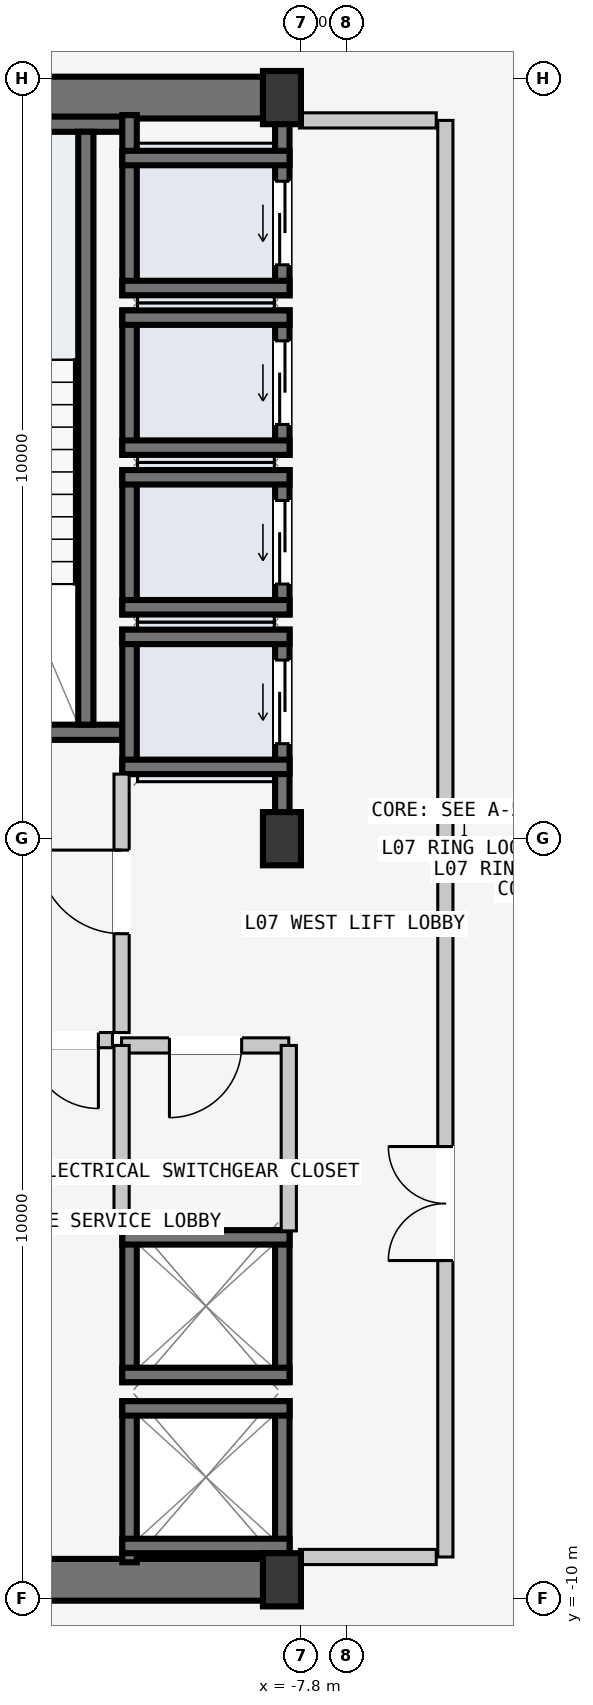
"""IFC4 building model, lengths in metres.
Left out: names, types, materials, properties, quantities, classifications, styles, units other than length and angle.
Written with IfcOpenShell. Run it as: python <this file> out.ifc"""

import sys

from ifc_helpers import new_model, si_unit, direction, frame, frame_2d, origin, origin_2d, place, context, subcontext, project, spatial, rectangle, i_section, extrude, element, fill, save


model = new_model("IFC4")
c1 = context("Model", 3, precision=1e-05, world=origin(), true_north=direction((0.0, 1.0)))
c2 = subcontext(c1, "Body", "Model", "MODEL_VIEW")
j1 = project(units=[si_unit("LENGTHUNIT", "METRE"), si_unit("PLANEANGLEUNIT", "RADIAN")], contexts=[c1])
p1 = place(None, origin())
s1 = spatial("IfcSite", under=j1, at=p1, CompositionType="ELEMENT")
p2 = place(p1, origin())
s2 = spatial("IfcBuilding", under=s1, at=p2, CompositionType="ELEMENT")
p3 = place(p2, frame((0.0, 0.0, 31.2)))
s3 = spatial("IfcBuildingStorey", under=s2, at=p3, CompositionType="ELEMENT", Elevation=31.2)
for number, where, z_axis, x_axis in (
    (1, (-14.53, -9.75, -0.2), (0.0, 0.0, 1.0), (1.0, 0.0, 0.0)),
    (2, (-14.53, 9.75, -0.2), (0.0, 0.0, 1.0), (1.0, 0.0, 0.0)),
):
    element("IfcWall", number, at=place(p3, frame(where, z_axis=z_axis, x_axis=x_axis)), inside=s3, PredefinedType="SHEAR", context=c2, shape_type="SweptSolid", body=[
        extrude(rectangle(XDim=6.46, YDim=0.55, at=frame_2d((3.23, 0.0))), origin(), (0.0, 0.0, 1.0), 3.6),
    ])
p4 = place(p3, frame((-14.25, 1.4, -0.2), z_axis=(0.0, 0.0, 1.0), x_axis=(1.0, 0.0, 0.0)))
e3 = element("IfcWall", 3, at=p4, inside=s3, PredefinedType="SOLIDWALL", context=c2, shape_type="SweptSolid", body=[
    extrude(rectangle(XDim=4.1, YDim=0.2, at=frame_2d((2.05, 0.0))), origin(), (0.0, 0.0, 1.0), 3.6),
])
p5 = place(p4, frame((1.5, 0.0, 0.2)))
e4 = element("IfcOpeningElement", 4, at=p5, cuts=e3, PredefinedType="OPENING", context=c2, shape_type="SweptSolid", body=[
    extrude(rectangle(XDim=1.12, YDim=2.18, at=frame_2d((0.56, 1.09))), frame((0.0, 0.11, 0.0), z_axis=(0.0, -1.0, 0.0), x_axis=(1.0, 0.0, 0.0)), (0.0, 0.0, 1.0), 0.22),
])
p6 = place(p3, frame((-14.25, 9.4, -0.2), z_axis=(0.0, 0.0, 1.0), x_axis=(1.0, 0.0, 0.0)))
e5 = element("IfcWall", 5, at=p6, inside=s3, PredefinedType="SOLIDWALL", context=c2, shape_type="SweptSolid", body=[
    extrude(rectangle(XDim=4.1, YDim=0.2, at=frame_2d((2.05, 0.0))), origin(), (0.0, 0.0, 1.0), 3.6),
])
p7 = place(p3, frame((-10.63, 1.5, -0.2), z_axis=(0.0, 0.0, 1.0), x_axis=(0.0, 1.0, 0.0)))
e6 = element("IfcWall", 6, at=p7, inside=s3, PredefinedType="SOLIDWALL", context=c2, shape_type="SweptSolid", body=[
    extrude(rectangle(XDim=7.8, YDim=0.2, at=frame_2d((3.9, 0.0))), origin(), (0.0, 0.0, 1.0), 3.6),
])
for number, where, z_axis, x_axis in (
    (7, (-8.05, -9.75, 0.0), (0.0, 0.0, 1.0), (1.0, 0.0, 0.0)),
    (8, (-8.05, 0.0, 0.0), (0.0, 0.0, 1.0), (1.0, 0.0, 0.0)),
    (9, (-8.05, 9.75, 0.0), (0.0, 0.0, 1.0), (1.0, 0.0, 0.0)),
):
    element("IfcColumn", number, at=place(p3, frame(where, z_axis=z_axis, x_axis=x_axis)), inside=s3, PredefinedType="COLUMN", context=c2, shape_type="SweptSolid", body=[
        extrude(i_section(OverallWidth=0.5, OverallDepth=0.7, WebThickness=0.028, FlangeThickness=0.045, at=origin_2d()), origin(), (0.0, 0.0, 1.0), 3.6),
    ])
p8 = place(p3, frame((-8.045, 0.21, -0.2), z_axis=(0.0, 0.0, 1.0), x_axis=(0.0, 1.0, 0.0)))
e10 = element("IfcWall", 10, at=p8, inside=s3, PredefinedType="SOLIDWALL", context=c2, shape_type="SweptSolid", body=[
    extrude(rectangle(XDim=2.54, YDim=0.19, at=frame_2d((1.27, 0.0))), origin(), (0.0, 0.0, 1.0), 3.6),
])
p9 = place(p8, frame((1.04, 0.0, 0.2)))
e11 = element("IfcOpeningElement", 11, at=p9, cuts=e10, PredefinedType="OPENING", context=c2, shape_type="SweptSolid", body=[
    extrude(rectangle(XDim=1.1, YDim=2.2, at=frame_2d((0.55, 1.1))), frame((0.0, 0.105, 0.0), z_axis=(0.0, -1.0, 0.0), x_axis=(1.0, 0.0, 0.0)), (0.0, 0.0, 1.0), 0.21),
])
p10 = place(p3, frame((-10.055, 0.85, -0.2), z_axis=(0.0, 0.0, 1.0), x_axis=(0.0, 1.0, 0.0)))
e12 = element("IfcWall", 12, at=p10, inside=s3, PredefinedType="SOLIDWALL", context=c2, shape_type="SweptSolid", body=[
    extrude(rectangle(XDim=1.9, YDim=0.19, at=frame_2d((0.95, 0.0))), origin(), (0.0, 0.0, 1.0), 3.6),
])
for number, where, z_axis, x_axis in (
    (13, (-10.15, 2.655, -0.2), (0.0, 0.0, 1.0), (1.0, 0.0, 0.0)),
    (14, (-10.15, 0.945, -0.2), (0.0, 0.0, 1.0), (1.0, 0.0, 0.0)),
):
    element("IfcWall", number, at=place(p3, frame(where, z_axis=z_axis, x_axis=x_axis)), inside=s3, PredefinedType="SOLIDWALL", context=c2, shape_type="SweptSolid", body=[
        extrude(rectangle(XDim=2.2, YDim=0.19, at=frame_2d((1.1, 0.0))), origin(), (0.0, 0.0, 1.0), 3.6),
    ])
p11 = place(p3, frame((-8.045, 2.95, -0.2), z_axis=(0.0, 0.0, 1.0), x_axis=(0.0, 1.0, 0.0)))
e15 = element("IfcWall", 15, at=p11, inside=s3, PredefinedType="SOLIDWALL", context=c2, shape_type="SweptSolid", body=[
    extrude(rectangle(XDim=1.9, YDim=0.19, at=frame_2d((0.95, 0.0))), origin(), (0.0, 0.0, 1.0), 3.6),
])
p12 = place(p11, frame((0.4, 0.0, 0.2)))
e16 = element("IfcOpeningElement", 16, at=p12, cuts=e15, PredefinedType="OPENING", context=c2, shape_type="SweptSolid", body=[
    extrude(rectangle(XDim=1.1, YDim=2.2, at=frame_2d((0.55, 1.1))), frame((0.0, 0.105, 0.0), z_axis=(0.0, -1.0, 0.0), x_axis=(1.0, 0.0, 0.0)), (0.0, 0.0, 1.0), 0.21),
])
p13 = place(p3, frame((-10.055, 2.95, -0.2), z_axis=(0.0, 0.0, 1.0), x_axis=(0.0, 1.0, 0.0)))
e17 = element("IfcWall", 17, at=p13, inside=s3, PredefinedType="SOLIDWALL", context=c2, shape_type="SweptSolid", body=[
    extrude(rectangle(XDim=1.9, YDim=0.19, at=frame_2d((0.95, 0.0))), origin(), (0.0, 0.0, 1.0), 3.6),
])
for number, where, z_axis, x_axis in (
    (18, (-10.15, 4.755, -0.2), (0.0, 0.0, 1.0), (1.0, 0.0, 0.0)),
    (19, (-10.15, 3.045, -0.2), (0.0, 0.0, 1.0), (1.0, 0.0, 0.0)),
):
    element("IfcWall", number, at=place(p3, frame(where, z_axis=z_axis, x_axis=x_axis)), inside=s3, PredefinedType="SOLIDWALL", context=c2, shape_type="SweptSolid", body=[
        extrude(rectangle(XDim=2.2, YDim=0.19, at=frame_2d((1.1, 0.0))), origin(), (0.0, 0.0, 1.0), 3.6),
    ])
p14 = place(p3, frame((-8.045, 5.05, -0.2), z_axis=(0.0, 0.0, 1.0), x_axis=(0.0, 1.0, 0.0)))
e20 = element("IfcWall", 20, at=p14, inside=s3, PredefinedType="SOLIDWALL", context=c2, shape_type="SweptSolid", body=[
    extrude(rectangle(XDim=1.9, YDim=0.19, at=frame_2d((0.95, 0.0))), origin(), (0.0, 0.0, 1.0), 3.6),
])
p15 = place(p14, frame((0.4, 0.0, 0.2)))
e21 = element("IfcOpeningElement", 21, at=p15, cuts=e20, PredefinedType="OPENING", context=c2, shape_type="SweptSolid", body=[
    extrude(rectangle(XDim=1.1, YDim=2.2, at=frame_2d((0.55, 1.1))), frame((0.0, 0.105, 0.0), z_axis=(0.0, -1.0, 0.0), x_axis=(1.0, 0.0, 0.0)), (0.0, 0.0, 1.0), 0.21),
])
p16 = place(p3, frame((-10.055, 5.05, -0.2), z_axis=(0.0, 0.0, 1.0), x_axis=(0.0, 1.0, 0.0)))
e22 = element("IfcWall", 22, at=p16, inside=s3, PredefinedType="SOLIDWALL", context=c2, shape_type="SweptSolid", body=[
    extrude(rectangle(XDim=1.9, YDim=0.19, at=frame_2d((0.95, 0.0))), origin(), (0.0, 0.0, 1.0), 3.6),
])
for number, where, z_axis, x_axis in (
    (23, (-10.15, 6.855, -0.2), (0.0, 0.0, 1.0), (1.0, 0.0, 0.0)),
    (24, (-10.15, 5.145, -0.2), (0.0, 0.0, 1.0), (1.0, 0.0, 0.0)),
):
    element("IfcWall", number, at=place(p3, frame(where, z_axis=z_axis, x_axis=x_axis)), inside=s3, PredefinedType="SOLIDWALL", context=c2, shape_type="SweptSolid", body=[
        extrude(rectangle(XDim=2.2, YDim=0.19, at=frame_2d((1.1, 0.0))), origin(), (0.0, 0.0, 1.0), 3.6),
    ])
p17 = place(p3, frame((-8.045, 7.15, -0.2), z_axis=(0.0, 0.0, 1.0), x_axis=(0.0, 1.0, 0.0)))
e25 = element("IfcWall", 25, at=p17, inside=s3, PredefinedType="SOLIDWALL", context=c2, shape_type="SweptSolid", body=[
    extrude(rectangle(XDim=2.37, YDim=0.19, at=frame_2d((1.185, 0.0))), origin(), (0.0, 0.0, 1.0), 3.6),
])
p18 = place(p17, frame((0.4, 0.0, 0.2)))
e26 = element("IfcOpeningElement", 26, at=p18, cuts=e25, PredefinedType="OPENING", context=c2, shape_type="SweptSolid", body=[
    extrude(rectangle(XDim=1.1, YDim=2.2, at=frame_2d((0.55, 1.1))), frame((0.0, 0.105, 0.0), z_axis=(0.0, -1.0, 0.0), x_axis=(1.0, 0.0, 0.0)), (0.0, 0.0, 1.0), 0.21),
])
p19 = place(p3, frame((-10.055, 7.15, -0.2), z_axis=(0.0, 0.0, 1.0), x_axis=(0.0, 1.0, 0.0)))
e27 = element("IfcWall", 27, at=p19, inside=s3, PredefinedType="SOLIDWALL", context=c2, shape_type="SweptSolid", body=[
    extrude(rectangle(XDim=2.37, YDim=0.19, at=frame_2d((1.185, 0.0))), origin(), (0.0, 0.0, 1.0), 3.6),
])
for number, where, z_axis, x_axis in (
    (28, (-10.15, 8.955, -0.2), (0.0, 0.0, 1.0), (1.0, 0.0, 0.0)),
    (29, (-10.15, 7.245, -0.2), (0.0, 0.0, 1.0), (1.0, 0.0, 0.0)),
):
    element("IfcWall", number, at=place(p3, frame(where, z_axis=z_axis, x_axis=x_axis)), inside=s3, PredefinedType="SOLIDWALL", context=c2, shape_type="SweptSolid", body=[
        extrude(rectangle(XDim=2.2, YDim=0.19, at=frame_2d((1.1, 0.0))), origin(), (0.0, 0.0, 1.0), 3.6),
    ])
for number, where, z_axis, x_axis in (
    (30, (-8.045, -9.52, -0.2), (0.0, 0.0, 1.0), (0.0, 1.0, 0.0)),
    (31, (-10.055, -9.52, -0.2), (0.0, 0.0, 1.0), (0.0, 1.0, 0.0)),
):
    element("IfcWall", number, at=place(p3, frame(where, z_axis=z_axis, x_axis=x_axis)), inside=s3, PredefinedType="SOLIDWALL", context=c2, shape_type="SweptSolid", body=[
        extrude(rectangle(XDim=2.12, YDim=0.19, at=frame_2d((1.06, 0.0))), origin(), (0.0, 0.0, 1.0), 3.6),
    ])
for number, where, z_axis, x_axis in (
    (32, (-10.15, -7.495, -0.2), (0.0, 0.0, 1.0), (1.0, 0.0, 0.0)),
    (33, (-10.15, -9.305, -0.2), (0.0, 0.0, 1.0), (1.0, 0.0, 0.0)),
):
    element("IfcWall", number, at=place(p3, frame(where, z_axis=z_axis, x_axis=x_axis)), inside=s3, PredefinedType="SOLIDWALL", context=c2, shape_type="SweptSolid", body=[
        extrude(rectangle(XDim=2.2, YDim=0.19, at=frame_2d((1.1, 0.0))), origin(), (0.0, 0.0, 1.0), 3.6),
    ])
for number, where, z_axis, x_axis in (
    (34, (-8.045, -7.15, -0.2), (0.0, 0.0, 1.0), (0.0, 1.0, 0.0)),
    (35, (-10.055, -7.15, -0.2), (0.0, 0.0, 1.0), (0.0, 1.0, 0.0)),
):
    element("IfcWall", number, at=place(p3, frame(where, z_axis=z_axis, x_axis=x_axis)), inside=s3, PredefinedType="SOLIDWALL", context=c2, shape_type="SweptSolid", body=[
        extrude(rectangle(XDim=2.0, YDim=0.19, at=frame_2d((1.0, 0.0))), origin(), (0.0, 0.0, 1.0), 3.6),
    ])
for number, where, z_axis, x_axis in (
    (36, (-10.15, -5.245, -0.2), (0.0, 0.0, 1.0), (1.0, 0.0, 0.0)),
    (37, (-10.15, -7.055, -0.2), (0.0, 0.0, 1.0), (1.0, 0.0, 0.0)),
):
    element("IfcWall", number, at=place(p3, frame(where, z_axis=z_axis, x_axis=x_axis)), inside=s3, PredefinedType="SOLIDWALL", context=c2, shape_type="SweptSolid", body=[
        extrude(rectangle(XDim=2.2, YDim=0.19, at=frame_2d((1.1, 0.0))), origin(), (0.0, 0.0, 1.0), 3.6),
    ])
p20 = place(p3, frame((-5.9, -9.45, 0.0), z_axis=(0.0, 0.0, 1.0), x_axis=(0.0, 1.0, 0.0)))
e38 = element("IfcWall", 38, at=p20, inside=s3, PredefinedType="PARTITIONING", context=c2, shape_type="SweptSolid", body=[
    extrude(rectangle(XDim=18.9, YDim=0.2, at=frame_2d((9.45, 0.0))), origin(), (0.0, 0.0, 1.0), 3.4),
])
p21 = place(p20, frame((3.9, 0.0, 0.0)))
e39 = element("IfcOpeningElement", 39, at=p21, cuts=e38, PredefinedType="OPENING", context=c2, shape_type="SweptSolid", body=[
    extrude(rectangle(XDim=1.5, YDim=2.2, at=frame_2d((0.75, 1.1))), frame((0.0, 0.11, 0.0), z_axis=(0.0, -1.0, 0.0), x_axis=(1.0, 0.0, 0.0)), (0.0, 0.0, 1.0), 0.22),
])
for number, where, z_axis, x_axis in (
    (40, (-6.02, -9.45, 0.0), (0.0, 0.0, 1.0), (-1.0, 0.0, 0.0)),
    (41, (-6.02, 9.45, 0.0), (0.0, 0.0, 1.0), (-1.0, 0.0, 0.0)),
):
    element("IfcWall", number, at=place(p3, frame(where, z_axis=z_axis, x_axis=x_axis)), inside=s3, PredefinedType="PARTITIONING", context=c2, shape_type="SweptSolid", body=[
        extrude(rectangle(XDim=1.8, YDim=0.2, at=frame_2d((0.9, 0.0))), origin(), (0.0, 0.0, 1.0), 3.4),
    ])
p22 = place(p3, frame((-10.16, -2.55, 0.0), z_axis=(0.0, 0.0, 1.0), x_axis=(0.0, 1.0, 0.0)))
e42 = element("IfcWall", 42, at=p22, inside=s3, PredefinedType="PARTITIONING", context=c2, shape_type="SweptSolid", body=[
    extrude(rectangle(XDim=3.4, YDim=0.2, at=frame_2d((1.7, 0.0))), origin(), (0.0, 0.0, 1.0), 3.4),
])
p23 = place(p22, frame((1.3, 0.0, 0.0)))
e43 = element("IfcOpeningElement", 43, at=p23, cuts=e42, PredefinedType="OPENING", context=c2, shape_type="SweptSolid", body=[
    extrude(rectangle(XDim=1.1, YDim=2.15, at=frame_2d((0.55, 1.075))), frame((0.0, 0.11, 0.0), z_axis=(0.0, -1.0, 0.0), x_axis=(1.0, 0.0, 0.0)), (0.0, 0.0, 1.0), 0.22),
])
p24 = place(p3, frame((-10.28, -2.65, 0.0), z_axis=(0.0, 0.0, 1.0), x_axis=(-1.0, 0.0, 0.0)))
e44 = element("IfcWall", 44, at=p24, inside=s3, PredefinedType="PARTITIONING", context=c2, shape_type="SweptSolid", body=[
    extrude(rectangle(XDim=1.27, YDim=0.2, at=frame_2d((0.635, 0.0))), origin(), (0.0, 0.0, 1.0), 3.4),
])
p25 = place(p24, frame((0.185, 0.0, 0.0)))
e45 = element("IfcOpeningElement", 45, at=p25, cuts=e44, PredefinedType="OPENING", context=c2, shape_type="SweptSolid", body=[
    extrude(rectangle(XDim=0.9, YDim=2.15, at=frame_2d((0.45, 1.075))), frame((0.0, 0.11, 0.0), z_axis=(0.0, -1.0, 0.0), x_axis=(1.0, 0.0, 0.0)), (0.0, 0.0, 1.0), 0.22),
])
p26 = place(p3, frame((-7.96, -2.72, 0.0), z_axis=(0.0, 0.0, 1.0), x_axis=(-1.0, 0.0, 0.0)))
e46 = element("IfcWall", 46, at=p26, inside=s3, PredefinedType="PARTITIONING", context=c2, shape_type="SweptSolid", body=[
    extrude(rectangle(XDim=2.2, YDim=0.2, at=frame_2d((1.1, 0.0))), origin(), (0.0, 0.0, 1.0), 3.4),
])
p27 = place(p26, frame((0.62, 0.0, 0.0)))
e47 = element("IfcOpeningElement", 47, at=p27, cuts=e46, PredefinedType="OPENING", context=c2, shape_type="SweptSolid", body=[
    extrude(rectangle(XDim=0.95, YDim=2.1, at=frame_2d((0.475, 1.05))), frame((0.0, 0.11, 0.0), z_axis=(0.0, -1.0, 0.0), x_axis=(1.0, 0.0, 0.0)), (0.0, 0.0, 1.0), 0.22),
])
for number, where, z_axis, x_axis in (
    (48, (-7.96, -5.16, 0.0), (0.0, 0.0, 1.0), (0.0, 1.0, 0.0)),
    (49, (-10.16, -5.16, 0.0), (0.0, 0.0, 1.0), (0.0, 1.0, 0.0)),
):
    element("IfcWall", number, at=place(p3, frame(where, z_axis=z_axis, x_axis=x_axis)), inside=s3, PredefinedType="PARTITIONING", context=c2, shape_type="SweptSolid", body=[
        extrude(rectangle(XDim=2.44, YDim=0.2, at=frame_2d((1.22, 0.0))), origin(), (0.0, 0.0, 1.0), 3.4),
    ])
p28 = place(p9, origin())
e50 = element("IfcDoor", 50, at=p28, inside=s3, OperationType="SLIDING_TO_LEFT", PredefinedType="DOOR", context=c2, shape_type="SweptSolid", body=[
    extrude(rectangle(XDim=1.1, YDim=2.2, at=frame_2d((0.55, 1.1))), frame((0.0, 0.025, 0.0), z_axis=(0.0, -1.0, 0.0), x_axis=(1.0, 0.0, 0.0)), (0.0, 0.0, 1.0), 0.05),
])
fill(e11, e50)
p29 = place(p12, origin())
e51 = element("IfcDoor", 51, at=p29, inside=s3, OperationType="SLIDING_TO_LEFT", PredefinedType="DOOR", context=c2, shape_type="SweptSolid", body=[
    extrude(rectangle(XDim=1.1, YDim=2.2, at=frame_2d((0.55, 1.1))), frame((0.0, 0.025, 0.0), z_axis=(0.0, -1.0, 0.0), x_axis=(1.0, 0.0, 0.0)), (0.0, 0.0, 1.0), 0.05),
])
fill(e16, e51)
p30 = place(p15, origin())
e52 = element("IfcDoor", 52, at=p30, inside=s3, OperationType="SLIDING_TO_LEFT", PredefinedType="DOOR", context=c2, shape_type="SweptSolid", body=[
    extrude(rectangle(XDim=1.1, YDim=2.2, at=frame_2d((0.55, 1.1))), frame((0.0, 0.025, 0.0), z_axis=(0.0, -1.0, 0.0), x_axis=(1.0, 0.0, 0.0)), (0.0, 0.0, 1.0), 0.05),
])
fill(e21, e52)
p31 = place(p18, origin())
e53 = element("IfcDoor", 53, at=p31, inside=s3, OperationType="SLIDING_TO_LEFT", PredefinedType="DOOR", context=c2, shape_type="SweptSolid", body=[
    extrude(rectangle(XDim=1.1, YDim=2.2, at=frame_2d((0.55, 1.1))), frame((0.0, 0.025, 0.0), z_axis=(0.0, -1.0, 0.0), x_axis=(1.0, 0.0, 0.0)), (0.0, 0.0, 1.0), 0.05),
])
fill(e26, e53)
p32 = place(p21, origin())
e54 = element("IfcDoor", 54, at=p32, inside=s3, OperationType="DOUBLE_DOOR_SINGLE_SWING", PredefinedType="DOOR", context=c2, shape_type="SweptSolid", body=[
    extrude(rectangle(XDim=1.5, YDim=2.2, at=frame_2d((0.75, 1.1))), frame((0.0, 0.025, 0.0), z_axis=(0.0, -1.0, 0.0), x_axis=(1.0, 0.0, 0.0)), (0.0, 0.0, 1.0), 0.05),
])
fill(e39, e54)
p33 = place(p23, origin())
e55 = element("IfcDoor", 55, at=p33, inside=s3, OperationType="SINGLE_SWING_RIGHT", PredefinedType="DOOR", context=c2, shape_type="SweptSolid", body=[
    extrude(rectangle(XDim=1.1, YDim=2.15, at=frame_2d((0.55, 1.075))), frame((0.0, 0.025, 0.0), z_axis=(0.0, -1.0, 0.0), x_axis=(1.0, 0.0, 0.0)), (0.0, 0.0, 1.0), 0.05),
])
fill(e43, e55)
p34 = place(p25, origin())
e56 = element("IfcDoor", 56, at=p34, inside=s3, OperationType="SINGLE_SWING_LEFT", PredefinedType="DOOR", context=c2, shape_type="SweptSolid", body=[
    extrude(rectangle(XDim=0.9, YDim=2.15, at=frame_2d((0.45, 1.075))), frame((0.0, 0.025, 0.0), z_axis=(0.0, -1.0, 0.0), x_axis=(1.0, 0.0, 0.0)), (0.0, 0.0, 1.0), 0.05),
])
fill(e45, e56)
p35 = place(p27, origin())
e57 = element("IfcDoor", 57, at=p35, inside=s3, OperationType="SINGLE_SWING_RIGHT", PredefinedType="DOOR", context=c2, shape_type="SweptSolid", body=[
    extrude(rectangle(XDim=0.95, YDim=2.1, at=frame_2d((0.475, 1.05))), frame((0.0, 0.025, 0.0), z_axis=(0.0, -1.0, 0.0), x_axis=(1.0, 0.0, 0.0)), (0.0, 0.0, 1.0), 0.05),
])
fill(e47, e57)
save(model, sys.argv[1])
